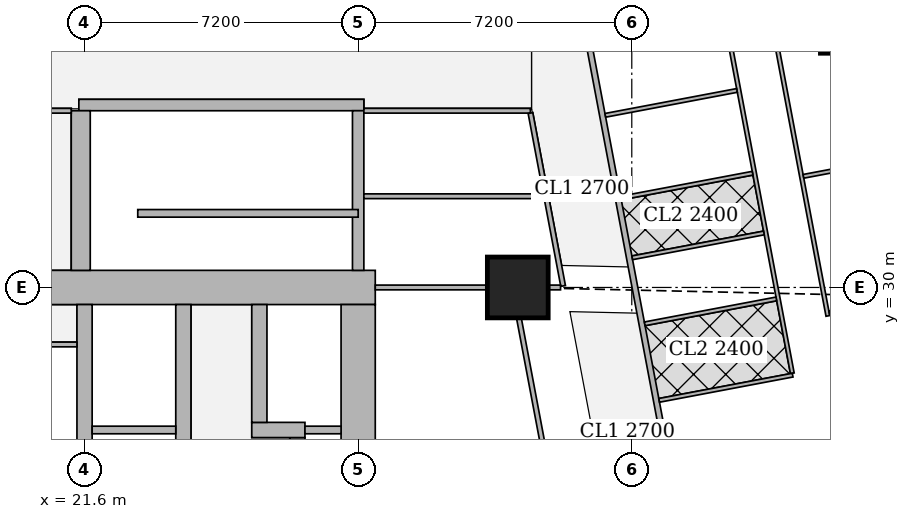
"""IFC4 building model, lengths in metres.
Left out: names, types, materials, properties, quantities, classifications, styles, units other than length and angle.
Written with IfcOpenShell. Run it as: python <this file> out.ifc"""

import sys

from ifc_helpers import new_model, si_unit, direction, frame, frame_2d, origin, origin_2d, place, context, subcontext, project, spatial, rectangle, extrude, element, fill, save


model = new_model("IFC4")
c1 = context("Model", 3, precision=1e-05, world=origin(), true_north=direction((0.0, 1.0)))
c2 = subcontext(c1, "Body", "Model", "MODEL_VIEW")
j1 = project(units=[si_unit("LENGTHUNIT", "METRE"), si_unit("PLANEANGLEUNIT", "RADIAN")], contexts=[c1])
p1 = place(None, origin())
s1 = spatial("IfcSite", under=j1, at=p1, CompositionType="ELEMENT")
p2 = place(p1, origin())
s2 = spatial("IfcBuilding", under=s1, at=p2, CompositionType="ELEMENT")
p3 = place(p2, frame((0.0, 0.0, 111.65)))
s3 = spatial("IfcBuildingStorey", under=s2, at=p3, CompositionType="ELEMENT", Elevation=111.65)
p4 = place(p3, frame((33.0, 30.0, 0.0), z_axis=(0.0, 0.0, 1.0), x_axis=(1.0, 0.0, 0.0)))
e1 = element("IfcColumn", 1, at=p4, inside=s3, PredefinedType="COLUMN", context=c2, shape_type="SweptSolid", body=[
    extrude(rectangle(XDim=1.6, YDim=1.6, at=origin_2d()), origin(), (0.0, 0.0, 1.0), 3.75),
])
p5 = place(p3, frame((42.064, 37.263, 0.0), z_axis=(0.0, 0.0, 1.0), x_axis=(1.0, 0.0, 0.0)))
e2 = element("IfcColumn", 2, at=p5, inside=s3, PredefinedType="COLUMN", context=c2, shape_type="SweptSolid", body=[
    extrude(rectangle(XDim=2.2, YDim=2.2, at=origin_2d()), origin(), (0.0, 0.0, 1.0), 3.75),
])
p6 = place(p3, frame((13.95, 30.0, 0.0), z_axis=(0.0, 0.0, 1.0), x_axis=(1.0, 0.0, 0.0)))
e3 = element("IfcWall", 3, at=p6, inside=s3, PredefinedType="SHEAR", context=c2, shape_type="SweptSolid", body=[
    extrude(rectangle(XDim=15.3, YDim=0.9, at=frame_2d((7.65, 0.0))), origin(), (0.0, 0.0, 1.0), 3.75),
])
p7 = place(p6, frame((4.45, 0.0, 0.0)))
e4 = element("IfcOpeningElement", 4, at=p7, cuts=e3, PredefinedType="OPENING", context=c2, shape_type="SweptSolid", body=[
    extrude(rectangle(XDim=1.8, YDim=2.1, at=frame_2d((0.9, 1.05))), frame((0.0, 0.46, 0.0), z_axis=(0.0, -1.0, 0.0), x_axis=(1.0, 0.0, 0.0)), (0.0, 0.0, 1.0), 0.92),
])
p8 = place(p6, frame((10.7, 0.0, 0.0)))
e5 = element("IfcOpeningElement", 5, at=p8, cuts=e3, PredefinedType="OPENING", context=c2, shape_type="SweptSolid", body=[
    extrude(rectangle(XDim=1.1, YDim=2.1, at=frame_2d((0.55, 1.05))), frame((0.0, 0.46, 0.0), z_axis=(0.0, -1.0, 0.0), x_axis=(1.0, 0.0, 0.0)), (0.0, 0.0, 1.0), 0.92),
])
p9 = place(p3, frame((28.8, 15.45, 0.0), z_axis=(0.0, 0.0, 1.0), x_axis=(0.0, 1.0, 0.0)))
e6 = element("IfcWall", 6, at=p9, inside=s3, PredefinedType="SHEAR", context=c2, shape_type="SweptSolid", body=[
    extrude(rectangle(XDim=14.1, YDim=0.9, at=frame_2d((7.05, 0.0))), origin(), (0.0, 0.0, 1.0), 3.75),
])
for number, where, z_axis, x_axis in (
    (7, (21.6, 15.45, 0.0), (0.0, 0.0, 1.0), (0.0, 1.0, 0.0)),
    (8, (24.2, 15.45, 0.0), (0.0, 0.0, 1.0), (0.0, 1.0, 0.0)),
):
    element("IfcWall", number, at=place(p3, frame(where, z_axis=z_axis, x_axis=x_axis)), inside=s3, PredefinedType="SHEAR", context=c2, shape_type="SweptSolid", body=[
        extrude(rectangle(XDim=14.1, YDim=0.4, at=frame_2d((7.05, 0.0))), origin(), (0.0, 0.0, 1.0), 3.75),
    ])
p10 = place(p3, frame((27.2, 18.95, 0.0), z_axis=(0.0, 0.0, 1.0), x_axis=(0.0, 1.0, 0.0)))
e9 = element("IfcWall", 9, at=p10, inside=s3, PredefinedType="SHEAR", context=c2, shape_type="SweptSolid", body=[
    extrude(rectangle(XDim=7.1, YDim=0.4, at=frame_2d((3.55, 0.0))), origin(), (0.0, 0.0, 1.0), 3.75),
])
p11 = place(p3, frame((26.0, 26.25, 0.0), z_axis=(0.0, 0.0, 1.0), x_axis=(1.0, 0.0, 0.0)))
e10 = element("IfcWall", 10, at=p11, inside=s3, PredefinedType="SHEAR", context=c2, shape_type="SweptSolid", body=[
    extrude(rectangle(XDim=1.4, YDim=0.4, at=frame_2d((0.7, 0.0))), origin(), (0.0, 0.0, 1.0), 3.75),
])
p12 = place(p3, frame((26.2, 26.45, 0.0), z_axis=(0.0, 0.0, 1.0), x_axis=(0.0, 1.0, 0.0)))
e11 = element("IfcWall", 11, at=p12, inside=s3, PredefinedType="SHEAR", context=c2, shape_type="SweptSolid", body=[
    extrude(rectangle(XDim=3.1, YDim=0.4, at=frame_2d((1.55, 0.0))), origin(), (0.0, 0.0, 1.0), 3.75),
])
p13 = place(p12, frame((1.075, 0.0, 0.0)))
e12 = element("IfcOpeningElement", 12, at=p13, cuts=e11, PredefinedType="OPENING", context=c2, shape_type="SweptSolid", body=[
    extrude(rectangle(XDim=1.2, YDim=2.1, at=frame_2d((0.6, 1.05))), frame((0.0, 0.21, 0.0), z_axis=(0.0, -1.0, 0.0), x_axis=(1.0, 0.0, 0.0)), (0.0, 0.0, 1.0), 0.42),
])
p14 = place(p3, frame((21.45, 34.8, 0.0), z_axis=(0.0, 0.0, 1.0), x_axis=(1.0, 0.0, 0.0)))
e13 = element("IfcWall", 13, at=p14, inside=s3, PredefinedType="SHEAR", context=c2, shape_type="SweptSolid", body=[
    extrude(rectangle(XDim=7.5, YDim=0.3, at=frame_2d((3.75, 0.0))), origin(), (0.0, 0.0, 1.0), 3.75),
])
p15 = place(p14, frame((0.5, 0.0, 0.0)))
e14 = element("IfcOpeningElement", 14, at=p15, cuts=e13, PredefinedType="OPENING", context=c2, shape_type="SweptSolid", body=[
    extrude(rectangle(XDim=1.1, YDim=2.1, at=frame_2d((0.55, 1.05))), frame((0.0, 0.16, 0.0), z_axis=(0.0, -1.0, 0.0), x_axis=(1.0, 0.0, 0.0)), (0.0, 0.0, 1.0), 0.32),
])
p16 = place(p3, frame((21.5, 30.45, 0.0), z_axis=(0.0, 0.0, 1.0), x_axis=(0.0, 1.0, 0.0)))
e15 = element("IfcWall", 15, at=p16, inside=s3, PredefinedType="SHEAR", context=c2, shape_type="SweptSolid", body=[
    extrude(rectangle(XDim=4.2, YDim=0.5, at=frame_2d((2.1, 0.0))), origin(), (0.0, 0.0, 1.0), 3.75),
])
p17 = place(p3, frame((28.8, 30.45, 0.0), z_axis=(0.0, 0.0, 1.0), x_axis=(0.0, 1.0, 0.0)))
e16 = element("IfcWall", 16, at=p17, inside=s3, PredefinedType="SHEAR", context=c2, shape_type="SweptSolid", body=[
    extrude(rectangle(XDim=4.2, YDim=0.3, at=frame_2d((2.1, 0.0))), origin(), (0.0, 0.0, 1.0), 3.75),
])
p18 = place(p3, frame((33.127, 45.65, 0.0), z_axis=(0.0, 0.0, 1.0), x_axis=(0.185598547723, -0.98262565562, 0.0)))
e17 = element("IfcWall", 17, at=p18, inside=s3, PredefinedType="SOLIDWALL", context=c2, shape_type="SweptSolid", body=[
    extrude(rectangle(XDim=47.118, YDim=0.15, at=frame_2d((23.559, 0.0))), origin(), (0.0, 0.0, 1.0), 2.2),
])
p19 = place(p18, frame((20.373, 0.0, 0.0)))
e18 = element("IfcOpeningElement", 18, at=p19, cuts=e17, PredefinedType="OPENING", context=c2, shape_type="SweptSolid", body=[
    extrude(rectangle(XDim=1.0, YDim=2.1, at=frame_2d((0.5, 1.05))), frame((0.0, 0.085, 0.0), z_axis=(0.0, -1.0, 0.0), x_axis=(1.0, 0.0, 0.0)), (0.0, 0.0, 1.0), 0.17),
])
p20 = place(p18, frame((24.188, 0.0, 0.0)))
e19 = element("IfcOpeningElement", 19, at=p20, cuts=e17, PredefinedType="OPENING", context=c2, shape_type="SweptSolid", body=[
    extrude(rectangle(XDim=1.0, YDim=2.1, at=frame_2d((0.5, 1.05))), frame((0.0, 0.085, 0.0), z_axis=(0.0, -1.0, 0.0), x_axis=(1.0, 0.0, 0.0)), (0.0, 0.0, 1.0), 0.17),
])
p21 = place(p18, frame((32.608, 0.0, 0.0)))
e20 = element("IfcOpeningElement", 20, at=p21, cuts=e17, PredefinedType="OPENING", context=c2, shape_type="SweptSolid", body=[
    extrude(rectangle(XDim=1.0, YDim=2.1, at=frame_2d((0.5, 1.05))), frame((0.0, 0.085, 0.0), z_axis=(0.0, -1.0, 0.0), x_axis=(1.0, 0.0, 0.0)), (0.0, 0.0, 1.0), 0.17),
])
p22 = place(p3, frame((38.862, 41.42, 0.0), z_axis=(0.0, 0.0, 1.0), x_axis=(0.185550092293, -0.982634806655, 0.0)))
e21 = element("IfcWall", 21, at=p22, inside=s3, PredefinedType="PARTITIONING", context=c2, shape_type="SweptSolid", body=[
    extrude(rectangle(XDim=12.384, YDim=0.1, at=frame_2d((6.192, 0.0))), origin(), (0.0, 0.0, 1.0), 2.5),
])
p23 = place(p22, frame((11.212, 0.0, 0.0)))
e22 = element("IfcOpeningElement", 22, at=p23, cuts=e21, PredefinedType="OPENING", context=c2, shape_type="SweptSolid", body=[
    extrude(rectangle(XDim=0.9, YDim=2.1, at=frame_2d((0.45, 1.05))), frame((0.0, 0.06, 0.0), z_axis=(0.0, -1.0, 0.0), x_axis=(1.0, 0.0, 0.0)), (0.0, 0.0, 1.0), 0.12),
])
p24 = place(p22, frame((7.555, 0.0, 0.0)))
e23 = element("IfcOpeningElement", 23, at=p24, cuts=e21, PredefinedType="OPENING", context=c2, shape_type="SweptSolid", body=[
    extrude(rectangle(XDim=0.9, YDim=2.1, at=frame_2d((0.45, 1.05))), frame((0.0, 0.06, 0.0), z_axis=(0.0, -1.0, 0.0), x_axis=(1.0, 0.0, 0.0)), (0.0, 0.0, 1.0), 0.12),
])
p25 = place(p22, frame((3.579, 0.0, 0.0)))
e24 = element("IfcOpeningElement", 24, at=p25, cuts=e21, PredefinedType="OPENING", context=c2, shape_type="SweptSolid", body=[
    extrude(rectangle(XDim=0.9, YDim=2.1, at=frame_2d((0.45, 1.05))), frame((0.0, 0.06, 0.0), z_axis=(0.0, -1.0, 0.0), x_axis=(1.0, 0.0, 0.0)), (0.0, 0.0, 1.0), 0.12),
])
p26 = place(p3, frame((37.473, 42.309, 0.0), z_axis=(0.0, 0.0, 1.0), x_axis=(0.185583982986, -0.982628406499, 0.0)))
e25 = element("IfcWall", 25, at=p26, inside=s3, PredefinedType="PARTITIONING", context=c2, shape_type="SweptSolid", body=[
    extrude(rectangle(XDim=14.825, YDim=0.1, at=frame_2d((7.412, 0.0))), origin(), (0.0, 0.0, 1.0), 2.5),
])
p27 = place(p26, frame((13.4, 0.0, 0.0)))
e26 = element("IfcOpeningElement", 26, at=p27, cuts=e25, PredefinedType="OPENING", context=c2, shape_type="SweptSolid", body=[
    extrude(rectangle(XDim=0.9, YDim=2.1, at=frame_2d((0.45, 1.05))), frame((0.0, 0.06, 0.0), z_axis=(0.0, -1.0, 0.0), x_axis=(1.0, 0.0, 0.0)), (0.0, 0.0, 1.0), 0.12),
])
p28 = place(p26, frame((9.808, 0.0, 0.0)))
e27 = element("IfcOpeningElement", 27, at=p28, cuts=e25, PredefinedType="OPENING", context=c2, shape_type="SweptSolid", body=[
    extrude(rectangle(XDim=0.9, YDim=2.1, at=frame_2d((0.45, 1.05))), frame((0.0, 0.06, 0.0), z_axis=(0.0, -1.0, 0.0), x_axis=(1.0, 0.0, 0.0)), (0.0, 0.0, 1.0), 0.12),
])
p29 = place(p26, frame((5.397, 0.0, 0.0)))
e28 = element("IfcOpeningElement", 28, at=p29, cuts=e25, PredefinedType="OPENING", context=c2, shape_type="SweptSolid", body=[
    extrude(rectangle(XDim=0.9, YDim=2.1, at=frame_2d((0.45, 1.05))), frame((0.0, 0.06, 0.0), z_axis=(0.0, -1.0, 0.0), x_axis=(1.0, 0.0, 0.0)), (0.0, 0.0, 1.0), 0.12),
])
p30 = place(p26, frame((2.853, 0.0, 0.0)))
e29 = element("IfcOpeningElement", 29, at=p30, cuts=e25, PredefinedType="OPENING", context=c2, shape_type="SweptSolid", body=[
    extrude(rectangle(XDim=0.9, YDim=2.1, at=frame_2d((0.45, 1.05))), frame((0.0, 0.06, 0.0), z_axis=(0.0, -1.0, 0.0), x_axis=(1.0, 0.0, 0.0)), (0.0, 0.0, 1.0), 0.12),
])
p31 = place(p26, frame((11.491, 0.0, 0.0)))
e30 = element("IfcOpeningElement", 30, at=p31, cuts=e25, PredefinedType="OPENING", context=c2, shape_type="SweptSolid", body=[
    extrude(rectangle(XDim=0.9, YDim=2.1, at=frame_2d((0.45, 1.05))), frame((0.0, 0.06, 0.0), z_axis=(0.0, -1.0, 0.0), x_axis=(1.0, 0.0, 0.0)), (0.0, 0.0, 1.0), 0.12),
])
p32 = place(p26, frame((7.9, 0.0, 0.0)))
e31 = element("IfcOpeningElement", 31, at=p32, cuts=e25, PredefinedType="OPENING", context=c2, shape_type="SweptSolid", body=[
    extrude(rectangle(XDim=0.9, YDim=2.1, at=frame_2d((0.45, 1.05))), frame((0.0, 0.06, 0.0), z_axis=(0.0, -1.0, 0.0), x_axis=(1.0, 0.0, 0.0)), (0.0, 0.0, 1.0), 0.12),
])
p33 = place(p3, frame((44.693, 33.713, 0.0), z_axis=(0.0, 0.0, 1.0), x_axis=(-0.982623519589, -0.185609856287, 0.0)))
e32 = element("IfcWall", 32, at=p33, inside=s3, PredefinedType="PARTITIONING", context=c2, shape_type="SweptSolid", body=[
    extrude(rectangle(XDim=4.25, YDim=0.1, at=frame_2d((2.125, 0.0))), origin(), (0.0, 0.0, 1.0), 2.2),
])
p34 = place(p3, frame((42.37, 29.554, 0.0), z_axis=(0.0, 0.0, 1.0), x_axis=(-0.982600492424, -0.185731721275, 0.0)))
e33 = element("IfcWall", 33, at=p34, inside=s3, PredefinedType="PARTITIONING", context=c2, shape_type="SweptSolid", body=[
    extrude(rectangle(XDim=1.195, YDim=0.1, at=frame_2d((0.597, 0.0))), origin(), (0.0, 0.0, 1.0), 2.5),
])
p35 = place(p3, frame((39.476, 31.434, 0.0), z_axis=(0.0, 0.0, 1.0), x_axis=(-0.982638553676, -0.185530247748, 0.0)))
e34 = element("IfcWall", 34, at=p35, inside=s3, PredefinedType="PARTITIONING", context=c2, shape_type="SweptSolid", body=[
    extrude(rectangle(XDim=3.525, YDim=0.1, at=frame_2d((1.763, 0.0))), origin(), (0.0, 0.0, 1.0), 3.5),
])
p36 = place(p3, frame((40.233, 27.693, 0.0), z_axis=(0.0, 0.0, 1.0), x_axis=(-0.982598214409, -0.185743772548, 0.0)))
e35 = element("IfcWall", 35, at=p36, inside=s3, PredefinedType="PARTITIONING", context=c2, shape_type="SweptSolid", body=[
    extrude(rectangle(XDim=3.575, YDim=0.1, at=frame_2d((1.788, 0.0))), origin(), (0.0, 0.0, 1.0), 3.5),
])
p37 = place(p3, frame((38.768, 35.184, 0.0), z_axis=(0.0, 0.0, 1.0), x_axis=(-0.982588017646, -0.185797706064, 0.0)))
e36 = element("IfcWall", 36, at=p37, inside=s3, PredefinedType="PARTITIONING", context=c2, shape_type="SweptSolid", body=[
    extrude(rectangle(XDim=3.525, YDim=0.1, at=frame_2d((1.763, 0.0))), origin(), (0.0, 0.0, 1.0), 3.5),
])
p38 = place(p3, frame((39.803, 29.698, 0.0), z_axis=(0.0, 0.0, 1.0), x_axis=(-0.982576058723, -0.185860939478, 0.0)))
e37 = element("IfcWall", 37, at=p38, inside=s3, PredefinedType="PARTITIONING", context=c2, shape_type="SweptSolid", body=[
    extrude(rectangle(XDim=3.524, YDim=0.1, at=frame_2d((1.762, 0.0))), origin(), (0.0, 0.0, 1.0), 2.5),
])
p39 = place(p3, frame((39.179, 33.006, 0.0), z_axis=(0.0, 0.0, 1.0), x_axis=(-0.982636169624, -0.185542874149, 0.0)))
e38 = element("IfcWall", 38, at=p39, inside=s3, PredefinedType="PARTITIONING", context=c2, shape_type="SweptSolid", body=[
    extrude(rectangle(XDim=3.525, YDim=0.1, at=frame_2d((1.763, 0.0))), origin(), (0.0, 0.0, 1.0), 3.5),
])
p40 = place(p3, frame((10.413, 34.65, 0.0), z_axis=(0.0, 0.0, 1.0), x_axis=(1.0, 0.0, 0.0)))
e39 = element("IfcWall", 39, at=p40, inside=s3, PredefinedType="PARTITIONING", context=c2, shape_type="SweptSolid", body=[
    extrude(rectangle(XDim=10.837, YDim=0.125, at=frame_2d((5.418, 0.0))), origin(), (0.0, 0.0, 1.0), 3.5),
])
p41 = place(p40, frame((7.487, 0.0, 0.0)))
e40 = element("IfcOpeningElement", 40, at=p41, cuts=e39, PredefinedType="OPENING", context=c2, shape_type="SweptSolid", body=[
    extrude(rectangle(XDim=1.8, YDim=2.1, at=frame_2d((0.9, 1.05))), frame((0.0, 0.073, 0.0), z_axis=(0.0, -1.0, 0.0), x_axis=(1.0, 0.0, 0.0)), (0.0, 0.0, 1.0), 0.145),
])
p42 = place(p3, frame((28.95, 34.65, 0.0), z_axis=(0.0, 0.0, 1.0), x_axis=(1.0, 0.0, 0.0)))
e41 = element("IfcWall", 41, at=p42, inside=s3, PredefinedType="PARTITIONING", context=c2, shape_type="SweptSolid", body=[
    extrude(rectangle(XDim=4.381, YDim=0.125, at=frame_2d((2.19, 0.0))), origin(), (0.0, 0.0, 1.0), 3.5),
])
p43 = place(p3, frame((34.193, 30.04, 0.0), z_axis=(0.0, 0.0, 1.0), x_axis=(-0.185626015863, 0.982620467034, 0.0)))
e42 = element("IfcWall", 42, at=p43, inside=s3, PredefinedType="PARTITIONING", context=c2, shape_type="SweptSolid", body=[
    extrude(rectangle(XDim=4.628, YDim=0.125, at=frame_2d((2.314, 0.0))), origin(), (0.0, 0.0, 1.0), 2.5),
])
p44 = place(p43, frame((1.05, 0.0, 0.0)))
e43 = element("IfcOpeningElement", 43, at=p44, cuts=e42, PredefinedType="OPENING", context=c2, shape_type="SweptSolid", body=[
    extrude(rectangle(XDim=1.0, YDim=2.1, at=frame_2d((0.5, 1.05))), frame((0.0, 0.073, 0.0), z_axis=(0.0, -1.0, 0.0), x_axis=(1.0, 0.0, 0.0)), (0.0, 0.0, 1.0), 0.145),
])
p45 = place(p43, frame((3.225, 0.0, 0.0)))
e44 = element("IfcOpeningElement", 44, at=p45, cuts=e42, PredefinedType="OPENING", context=c2, shape_type="SweptSolid", body=[
    extrude(rectangle(XDim=1.0, YDim=2.1, at=frame_2d((0.5, 1.05))), frame((0.0, 0.073, 0.0), z_axis=(0.0, -1.0, 0.0), x_axis=(1.0, 0.0, 0.0)), (0.0, 0.0, 1.0), 0.145),
])
p46 = place(p3, frame((35.557, 15.813, 0.0), z_axis=(0.0, 0.0, 1.0), x_axis=(-0.185583681679, 0.982628463405, 0.0)))
e45 = element("IfcWall", 45, at=p46, inside=s3, PredefinedType="PARTITIONING", context=c2, shape_type="SweptSolid", body=[
    extrude(rectangle(XDim=13.61, YDim=0.125, at=frame_2d((6.805, 0.0))), origin(), (0.0, 0.0, 1.0), 2.5),
])
p47 = place(p46, frame((5.1, 0.0, 0.0)))
e46 = element("IfcOpeningElement", 46, at=p47, cuts=e45, PredefinedType="OPENING", context=c2, shape_type="SweptSolid", body=[
    extrude(rectangle(XDim=1.0, YDim=2.1, at=frame_2d((0.5, 1.05))), frame((0.0, 0.073, 0.0), z_axis=(0.0, -1.0, 0.0), x_axis=(1.0, 0.0, 0.0)), (0.0, 0.0, 1.0), 0.145),
])
p48 = place(p3, frame((29.25, 30.0, 0.0), z_axis=(0.0, 0.0, 1.0), x_axis=(1.0, 0.0, 0.0)))
e47 = element("IfcWall", 47, at=p48, inside=s3, PredefinedType="PARTITIONING", context=c2, shape_type="SweptSolid", body=[
    extrude(rectangle(XDim=2.949, YDim=0.125, at=frame_2d((1.475, 0.0))), origin(), (0.0, 0.0, 1.0), 3.5),
])
p49 = place(p3, frame((33.801, 30.0, 0.0), z_axis=(0.0, 0.0, 1.0), x_axis=(1.0, 0.0, 0.0)))
e48 = element("IfcWall", 48, at=p49, inside=s3, PredefinedType="PARTITIONING", context=c2, shape_type="SweptSolid", body=[
    extrude(rectangle(XDim=0.324, YDim=0.125, at=frame_2d((0.162, 0.0))), origin(), (0.0, 0.0, 1.0), 2.5),
])
p50 = place(p3, frame((28.95, 32.4, 0.0), z_axis=(0.0, 0.0, 1.0), x_axis=(1.0, 0.0, 0.0)))
e49 = element("IfcWall", 49, at=p50, inside=s3, PredefinedType="PARTITIONING", context=c2, shape_type="SweptSolid", body=[
    extrude(rectangle(XDim=4.722, YDim=0.125, at=frame_2d((2.361, 0.0))), origin(), (0.0, 0.0, 1.0), 3.5),
])
p51 = place(p3, frame((20.663, 28.5, 0.0), z_axis=(0.0, 0.0, 1.0), x_axis=(1.0, 0.0, 0.0)))
e50 = element("IfcWall", 50, at=p51, inside=s3, PredefinedType="PARTITIONING", context=c2, shape_type="SweptSolid", body=[
    extrude(rectangle(XDim=0.737, YDim=0.125, at=frame_2d((0.368, 0.0))), origin(), (0.0, 0.0, 1.0), 3.5),
])
p52 = place(p3, frame((23.0, 31.95, 0.0), z_axis=(0.0, 0.0, 1.0), x_axis=(1.0, 0.0, 0.0)))
e51 = element("IfcWall", 51, at=p52, inside=s3, PredefinedType="SHEAR", context=c2, shape_type="SweptSolid", body=[
    extrude(rectangle(XDim=5.8, YDim=0.2, at=frame_2d((2.9, 0.0))), origin(), (0.0, 0.0, 1.0), 3.75),
])
p53 = place(p3, frame((21.8, 26.25, 0.0), z_axis=(0.0, 0.0, 1.0), x_axis=(1.0, 0.0, 0.0)))
e52 = element("IfcWall", 52, at=p53, inside=s3, PredefinedType="SOLIDWALL", context=c2, shape_type="SweptSolid", body=[
    extrude(rectangle(XDim=2.2, YDim=0.2, at=frame_2d((1.1, 0.0))), origin(), (0.0, 0.0, 1.0), 3.5),
])
p54 = place(p3, frame((27.4, 26.25, 0.0), z_axis=(0.0, 0.0, 1.0), x_axis=(1.0, 0.0, 0.0)))
e53 = element("IfcWall", 53, at=p54, inside=s3, PredefinedType="SOLIDWALL", context=c2, shape_type="SweptSolid", body=[
    extrude(rectangle(XDim=0.95, YDim=0.2, at=frame_2d((0.475, 0.0))), origin(), (0.0, 0.0, 1.0), 3.5),
])
p55 = place(p23, origin())
e54 = element("IfcDoor", 54, at=p55, inside=s3, OperationType="SINGLE_SWING_RIGHT", PredefinedType="DOOR", context=c2, shape_type="SweptSolid", body=[
    extrude(rectangle(XDim=0.9, YDim=2.1, at=frame_2d((0.45, 1.05))), frame((0.0, 0.025, 0.0), z_axis=(0.0, -1.0, 0.0), x_axis=(1.0, 0.0, 0.0)), (0.0, 0.0, 1.0), 0.05),
])
fill(e22, e54)
p56 = place(p24, origin())
e55 = element("IfcDoor", 55, at=p56, inside=s3, OperationType="SINGLE_SWING_RIGHT", PredefinedType="DOOR", context=c2, shape_type="SweptSolid", body=[
    extrude(rectangle(XDim=0.9, YDim=2.1, at=frame_2d((0.45, 1.05))), frame((0.0, 0.025, 0.0), z_axis=(0.0, -1.0, 0.0), x_axis=(1.0, 0.0, 0.0)), (0.0, 0.0, 1.0), 0.05),
])
fill(e23, e55)
p57 = place(p27, origin())
e56 = element("IfcDoor", 56, at=p57, inside=s3, OperationType="SINGLE_SWING_LEFT", PredefinedType="DOOR", context=c2, shape_type="SweptSolid", body=[
    extrude(rectangle(XDim=0.9, YDim=2.1, at=frame_2d((0.45, 1.05))), frame((0.0, 0.025, 0.0), z_axis=(0.0, -1.0, 0.0), x_axis=(1.0, 0.0, 0.0)), (0.0, 0.0, 1.0), 0.05),
])
fill(e26, e56)
p58 = place(p28, origin())
e57 = element("IfcDoor", 57, at=p58, inside=s3, OperationType="SINGLE_SWING_LEFT", PredefinedType="DOOR", context=c2, shape_type="SweptSolid", body=[
    extrude(rectangle(XDim=0.9, YDim=2.1, at=frame_2d((0.45, 1.05))), frame((0.0, 0.025, 0.0), z_axis=(0.0, -1.0, 0.0), x_axis=(1.0, 0.0, 0.0)), (0.0, 0.0, 1.0), 0.05),
])
fill(e27, e57)
p59 = place(p29, origin())
e58 = element("IfcDoor", 58, at=p59, inside=s3, OperationType="SINGLE_SWING_LEFT", PredefinedType="DOOR", context=c2, shape_type="SweptSolid", body=[
    extrude(rectangle(XDim=0.9, YDim=2.1, at=frame_2d((0.45, 1.05))), frame((0.0, 0.025, 0.0), z_axis=(0.0, -1.0, 0.0), x_axis=(1.0, 0.0, 0.0)), (0.0, 0.0, 1.0), 0.05),
])
fill(e28, e58)
p60 = place(p31, origin())
e59 = element("IfcDoor", 59, at=p60, inside=s3, OperationType="SINGLE_SWING_RIGHT", PredefinedType="DOOR", context=c2, shape_type="SweptSolid", body=[
    extrude(rectangle(XDim=0.9, YDim=2.1, at=frame_2d((0.45, 1.05))), frame((0.0, 0.025, 0.0), z_axis=(0.0, -1.0, 0.0), x_axis=(1.0, 0.0, 0.0)), (0.0, 0.0, 1.0), 0.05),
])
fill(e30, e59)
p61 = place(p32, origin())
e60 = element("IfcDoor", 60, at=p61, inside=s3, OperationType="SINGLE_SWING_RIGHT", PredefinedType="DOOR", context=c2, shape_type="SweptSolid", body=[
    extrude(rectangle(XDim=0.9, YDim=2.1, at=frame_2d((0.45, 1.05))), frame((0.0, 0.025, 0.0), z_axis=(0.0, -1.0, 0.0), x_axis=(1.0, 0.0, 0.0)), (0.0, 0.0, 1.0), 0.05),
])
fill(e31, e60)
p62 = place(p44, origin())
e61 = element("IfcDoor", 61, at=p62, inside=s3, OperationType="SINGLE_SWING_RIGHT", PredefinedType="DOOR", context=c2, shape_type="SweptSolid", body=[
    extrude(rectangle(XDim=1.0, YDim=2.1, at=frame_2d((0.5, 1.05))), frame((0.0, 0.025, 0.0), z_axis=(0.0, -1.0, 0.0), x_axis=(1.0, 0.0, 0.0)), (0.0, 0.0, 1.0), 0.05),
])
fill(e43, e61)
p63 = place(p45, origin())
e62 = element("IfcDoor", 62, at=p63, inside=s3, OperationType="SINGLE_SWING_RIGHT", PredefinedType="DOOR", context=c2, shape_type="SweptSolid", body=[
    extrude(rectangle(XDim=1.0, YDim=2.1, at=frame_2d((0.5, 1.05))), frame((0.0, 0.025, 0.0), z_axis=(0.0, -1.0, 0.0), x_axis=(1.0, 0.0, 0.0)), (0.0, 0.0, 1.0), 0.05),
])
fill(e44, e62)
p64 = place(p8, origin())
e63 = element("IfcDoor", 63, at=p64, inside=s3, OperationType="SINGLE_SWING_RIGHT", PredefinedType="DOOR", context=c2, shape_type="SweptSolid", body=[
    extrude(rectangle(XDim=1.1, YDim=2.1, at=frame_2d((0.55, 1.05))), frame((0.0, 0.025, 0.0), z_axis=(0.0, -1.0, 0.0), x_axis=(1.0, 0.0, 0.0)), (0.0, 0.0, 1.0), 0.05),
])
fill(e5, e63)
p65 = place(p13, origin())
e64 = element("IfcDoor", 64, at=p65, inside=s3, OperationType="DOUBLE_DOOR_SLIDING", PredefinedType="DOOR", context=c2, shape_type="SweptSolid", body=[
    extrude(rectangle(XDim=1.2, YDim=2.1, at=frame_2d((0.6, 1.05))), frame((0.0, 0.025, 0.0), z_axis=(0.0, -1.0, 0.0), x_axis=(1.0, 0.0, 0.0)), (0.0, 0.0, 1.0), 0.05),
])
fill(e12, e64)
p66 = place(p15, origin())
e65 = element("IfcDoor", 65, at=p66, inside=s3, OperationType="SINGLE_SWING_RIGHT", PredefinedType="DOOR", context=c2, shape_type="SweptSolid", body=[
    extrude(rectangle(XDim=1.1, YDim=2.1, at=frame_2d((0.55, 1.05))), frame((0.0, 0.025, 0.0), z_axis=(0.0, -1.0, 0.0), x_axis=(1.0, 0.0, 0.0)), (0.0, 0.0, 1.0), 0.05),
])
fill(e14, e65)
save(model, sys.argv[1])
